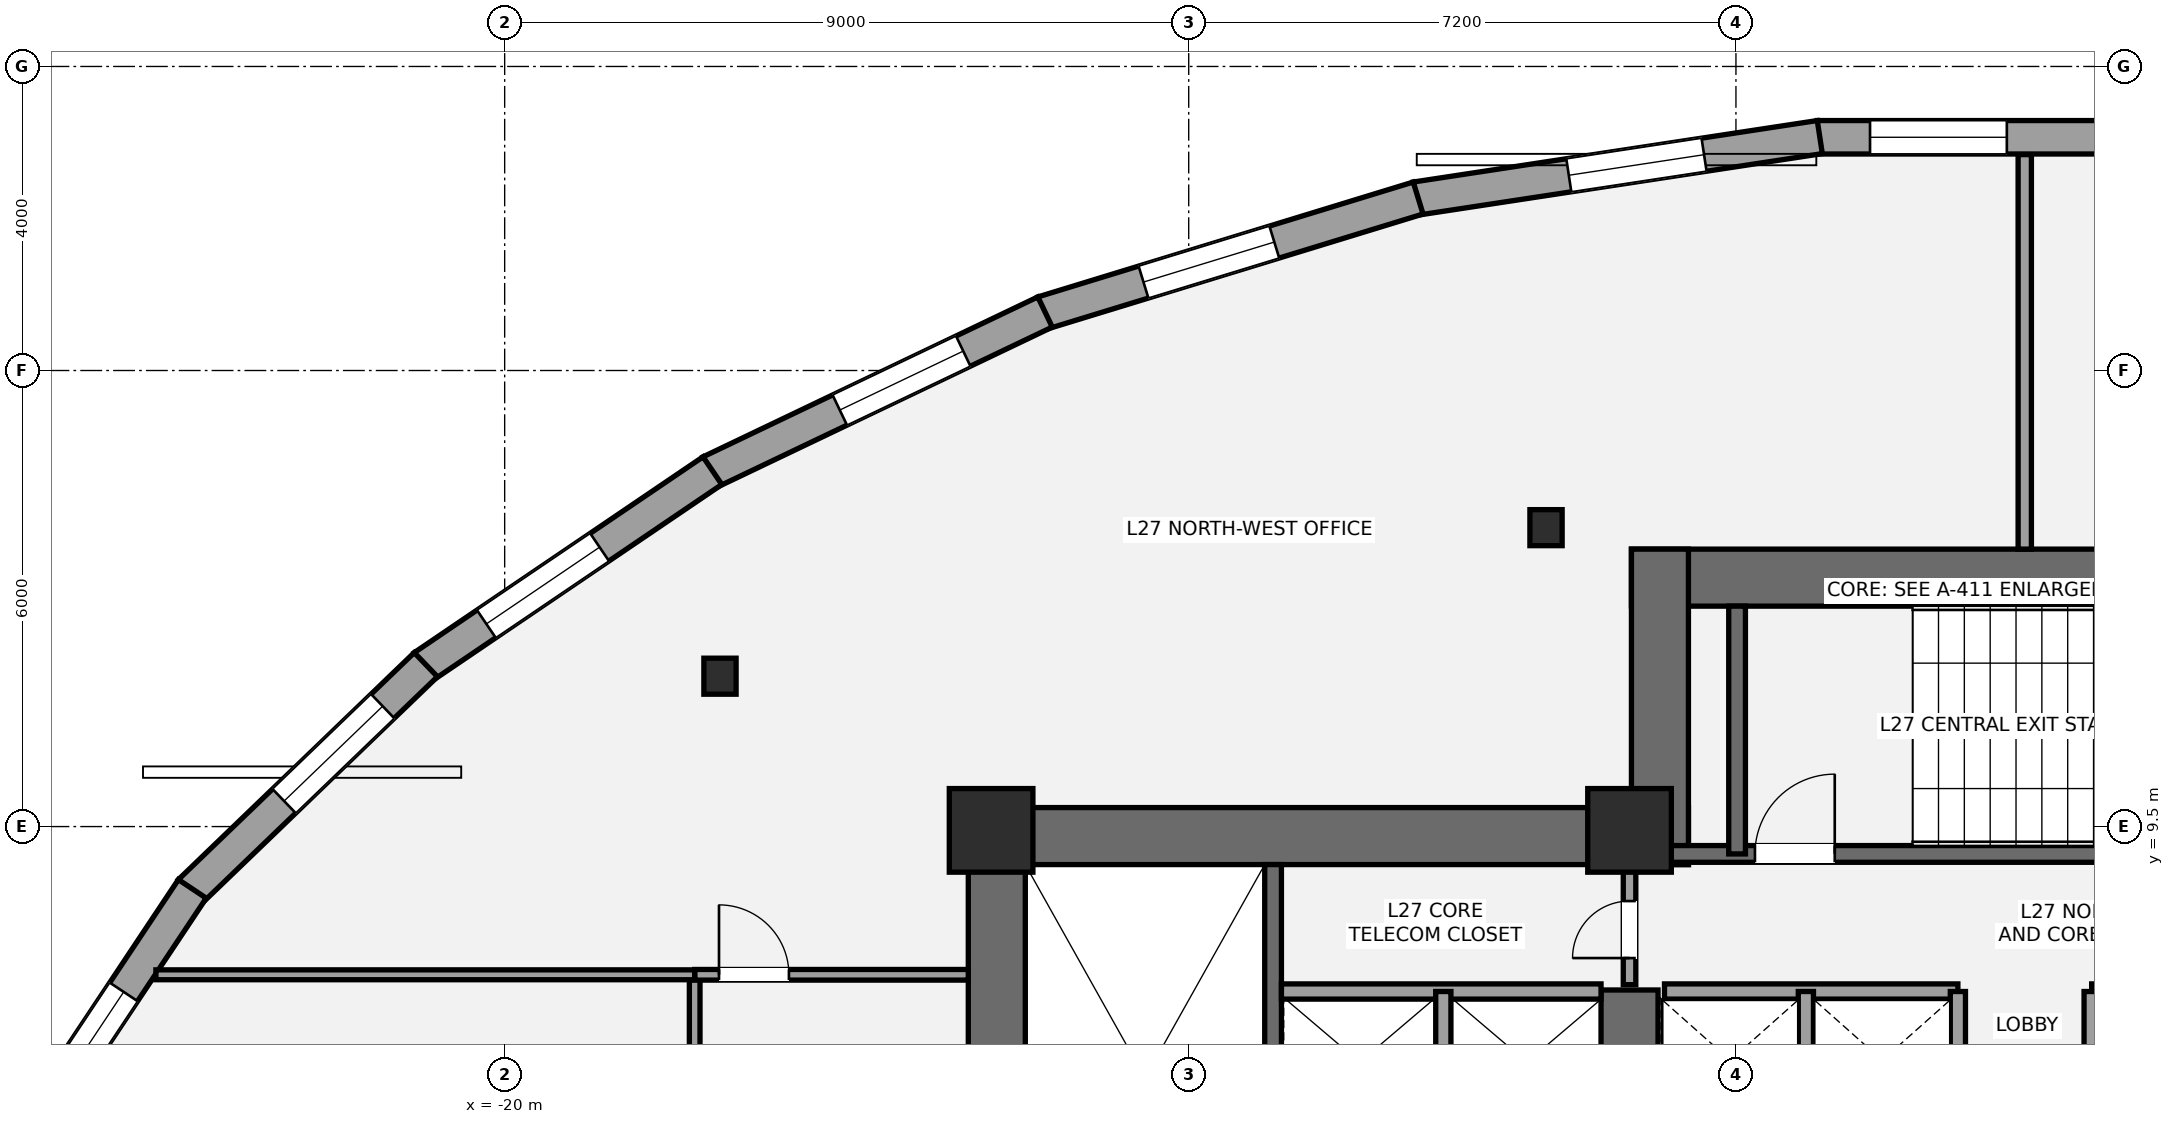
"""IFC4 building model, lengths in metres.
Left out: names, types, materials, properties, quantities, classifications, styles, units other than length and angle.
Written with IfcOpenShell. Run it as: python <this file> out.ifc"""

import sys

from ifc_helpers import new_model, si_unit, direction, frame, frame_2d, origin, origin_2d, place, context, subcontext, project, spatial, rectangle, i_section, extrude, element, fill, save


model = new_model("IFC4")
c1 = context("Model", 3, precision=1e-05, world=origin(), true_north=direction((0.0, 1.0)))
c2 = subcontext(c1, "Body", "Model", "MODEL_VIEW")
j1 = project(units=[si_unit("LENGTHUNIT", "METRE"), si_unit("PLANEANGLEUNIT", "RADIAN")], contexts=[c1])
p1 = place(None, origin())
s1 = spatial("IfcSite", under=j1, at=p1, CompositionType="ELEMENT")
p2 = place(p1, origin())
s2 = spatial("IfcBuilding", under=s1, at=p2, CompositionType="ELEMENT")
p3 = place(p2, frame((0.0, 0.0, 103.6)))
s3 = spatial("IfcBuildingStorey", under=s2, at=p3, CompositionType="ELEMENT", Elevation=103.6)
p4 = place(p3, frame((-13.525, 1.1, 0.0), z_axis=(0.0, 0.0, 1.0), x_axis=(0.0, 1.0, 0.0)))
e1 = element("IfcWall", 1, at=p4, inside=s3, PredefinedType="SHEAR", context=c2, shape_type="SweptSolid", body=[
    extrude(rectangle(XDim=8.65, YDim=0.75, at=frame_2d((4.325, 0.0))), origin(), (0.0, 0.0, 1.0), 3.5),
])
p5 = place(p3, frame((-13.9, 9.375, 0.0), z_axis=(0.0, 0.0, 1.0), x_axis=(1.0, 0.0, 0.0)))
e2 = element("IfcWall", 2, at=p5, inside=s3, PredefinedType="SHEAR", context=c2, shape_type="SweptSolid", body=[
    extrude(rectangle(XDim=9.475, YDim=0.75, at=frame_2d((4.737, 0.0))), origin(), (0.0, 0.0, 1.0), 3.5),
])
p6 = place(p3, frame((-5.2, 5.35, 0.0), z_axis=(0.0, 0.0, 1.0), x_axis=(0.0, 1.0, 0.0)))
e3 = element("IfcWall", 3, at=p6, inside=s3, PredefinedType="SHEAR", context=c2, shape_type="SweptSolid", body=[
    extrude(rectangle(XDim=2.0, YDim=0.75, at=frame_2d((1.0, 0.0))), origin(), (0.0, 0.0, 1.0), 3.5),
])
p7 = place(p3, frame((-9.89, 1.85, 0.0), z_axis=(0.0, 0.0, 1.0), x_axis=(0.0, 1.0, 0.0)))
e4 = element("IfcWall", 4, at=p7, inside=s3, PredefinedType="SHEAR", context=c2, shape_type="SweptSolid", body=[
    extrude(rectangle(XDim=7.15, YDim=0.22, at=frame_2d((3.575, 0.0))), origin(), (0.0, 0.0, 1.0), 3.5),
])
p8 = place(p3, frame((-5.175, 12.775, 0.0), z_axis=(0.0, 0.0, 1.0), x_axis=(1.0, 0.0, 0.0)))
e5 = element("IfcWall", 5, at=p8, inside=s3, PredefinedType="SHEAR", context=c2, shape_type="SweptSolid", body=[
    extrude(rectangle(XDim=10.35, YDim=0.75, at=frame_2d((5.175, 0.0))), origin(), (0.0, 0.0, 1.0), 3.5),
])
p9 = place(p3, frame((-4.8, 9.0, 0.0), z_axis=(0.0, 0.0, 1.0), x_axis=(0.0, 1.0, 0.0)))
e6 = element("IfcWall", 6, at=p9, inside=s3, PredefinedType="SHEAR", context=c2, shape_type="SweptSolid", body=[
    extrude(rectangle(XDim=4.15, YDim=0.75, at=frame_2d((2.075, 0.0))), origin(), (0.0, 0.0, 1.0), 3.5),
])
p10 = place(p3, frame((-4.7, 9.14, 0.0), z_axis=(0.0, 0.0, 1.0), x_axis=(1.0, 0.0, 0.0)))
e7 = element("IfcWall", 7, at=p10, inside=s3, PredefinedType="SHEAR", context=c2, shape_type="SweptSolid", body=[
    extrude(rectangle(XDim=9.3, YDim=0.22, at=frame_2d((4.65, 0.0))), origin(), (0.0, 0.0, 1.0), 3.5),
])
p11 = place(p10, frame((1.15, 0.0, 0.0)))
e8 = element("IfcOpeningElement", 8, at=p11, cuts=e7, PredefinedType="OPENING", context=c2, shape_type="SweptSolid", body=[
    extrude(rectangle(XDim=1.05, YDim=2.15, at=frame_2d((0.525, 1.075))), frame((0.0, 0.12, 0.0), z_axis=(0.0, -1.0, 0.0), x_axis=(1.0, 0.0, 0.0)), (0.0, 0.0, 1.0), 0.24),
])
p12 = place(p3, frame((-3.785, 9.14, 0.0), z_axis=(0.0, 0.0, 1.0), x_axis=(0.0, 1.0, 0.0)))
e9 = element("IfcWall", 9, at=p12, inside=s3, PredefinedType="SHEAR", context=c2, shape_type="SweptSolid", body=[
    extrude(rectangle(XDim=3.26, YDim=0.22, at=frame_2d((1.63, 0.0))), origin(), (0.0, 0.0, 1.0), 3.5),
])
for number, where, z_axis, x_axis in (
    (10, (-13.6, 9.45, 0.0), (0.0, 0.0, 1.0), (1.0, 0.0, 0.0)),
    (11, (-5.2, 9.45, 0.0), (0.0, 0.0, 1.0), (1.0, 0.0, 0.0)),
):
    element("IfcColumn", number, at=place(p3, frame(where, z_axis=z_axis, x_axis=x_axis)), inside=s3, PredefinedType="COLUMN", context=c2, shape_type="SweptSolid", body=[
        extrude(rectangle(XDim=1.1, YDim=1.1, at=origin_2d()), origin(), (0.0, 0.0, 1.0), 3.5),
    ])
for number, where, z_axis, x_axis in (
    (12, (-6.299, 13.433, 0.0), (0.0, 0.0, 1.0), (1.0, 0.0, 0.0)),
    (13, (-17.167, 11.478, 0.0), (0.0, 0.0, 1.0), (1.0, 0.0, 0.0)),
):
    element("IfcColumn", number, at=place(p3, frame(where, z_axis=z_axis, x_axis=x_axis)), inside=s3, PredefinedType="COLUMN", context=c2, shape_type="SweptSolid", body=[
        extrude(i_section(OverallWidth=0.424, OverallDepth=0.474, WebThickness=0.048, FlangeThickness=0.077, at=origin_2d()), origin(), (0.0, 0.0, 1.0), 3.5),
    ])
p13 = place(p3, frame((-2.73, 18.568, 0.0), z_axis=(0.0, 0.0, 1.0), x_axis=(1.0, 0.0, 0.0)))
e14 = element("IfcWall", 14, at=p13, inside=s3, PredefinedType="STANDARD", context=c2, shape_type="SweptSolid", body=[
    extrude(rectangle(XDim=5.459, YDim=0.44, at=frame_2d((2.73, 0.0))), origin(), (0.0, 0.0, 1.0), 2.528),
])
p14 = place(p13, frame((0.694, 0.0, 0.65)))
e15 = element("IfcOpeningElement", 15, at=p14, cuts=e14, PredefinedType="OPENING", context=c2, shape_type="SweptSolid", body=[
    extrude(rectangle(XDim=1.8, YDim=1.7, at=frame_2d((0.9, 0.85))), frame((0.0, 0.23, 0.0), z_axis=(0.0, -1.0, 0.0), x_axis=(1.0, 0.0, 0.0)), (0.0, 0.0, 1.0), 0.46),
])
p15 = place(p3, frame((-8.012, 17.762, 0.0), z_axis=(0.0, 0.0, 1.0), x_axis=(0.988627497469, 0.150385076545, 0.0)))
e16 = element("IfcWall", 16, at=p15, inside=s3, PredefinedType="STANDARD", context=c2, shape_type="SweptSolid", body=[
    extrude(rectangle(XDim=5.377, YDim=0.44, at=frame_2d((2.688, 0.0))), origin(), (0.0, 0.0, 1.0), 2.528),
])
p16 = place(p15, frame((2.037, 0.0, 0.65)))
e17 = element("IfcOpeningElement", 17, at=p16, cuts=e16, PredefinedType="OPENING", context=c2, shape_type="SweptSolid", body=[
    extrude(rectangle(XDim=1.8, YDim=1.7, at=frame_2d((0.9, 0.85))), frame((0.0, 0.23, 0.0), z_axis=(0.0, -1.0, 0.0), x_axis=(1.0, 0.0, 0.0)), (0.0, 0.0, 1.0), 0.46),
])
p17 = place(p3, frame((-12.92, 16.258, 0.0), z_axis=(0.0, 0.0, 1.0), x_axis=(0.956228569431, 0.292620783617, 0.0)))
e18 = element("IfcWall", 18, at=p17, inside=s3, PredefinedType="STANDARD", context=c2, shape_type="SweptSolid", body=[
    extrude(rectangle(XDim=5.165, YDim=0.44, at=frame_2d((2.583, 0.0))), origin(), (0.0, 0.0, 1.0), 2.528),
])
p18 = place(p17, frame((1.386, 0.0, 0.65)))
e19 = element("IfcOpeningElement", 19, at=p18, cuts=e18, PredefinedType="OPENING", context=c2, shape_type="SweptSolid", body=[
    extrude(rectangle(XDim=1.8, YDim=1.7, at=frame_2d((0.9, 0.85))), frame((0.0, 0.23, 0.0), z_axis=(0.0, -1.0, 0.0), x_axis=(1.0, 0.0, 0.0)), (0.0, 0.0, 1.0), 0.46),
])
p19 = place(p3, frame((-17.295, 14.166, 0.0), z_axis=(0.0, 0.0, 1.0), x_axis=(0.902372757907, 0.430956385018, 0.0)))
e20 = element("IfcWall", 20, at=p19, inside=s3, PredefinedType="STANDARD", context=c2, shape_type="SweptSolid", body=[
    extrude(rectangle(XDim=4.882, YDim=0.44, at=frame_2d((2.441, 0.0))), origin(), (0.0, 0.0, 1.0), 2.528),
])
p20 = place(p19, frame((1.888, 0.0, 0.65)))
e21 = element("IfcOpeningElement", 21, at=p20, cuts=e20, PredefinedType="OPENING", context=c2, shape_type="SweptSolid", body=[
    extrude(rectangle(XDim=1.8, YDim=1.7, at=frame_2d((0.9, 0.85))), frame((0.0, 0.23, 0.0), z_axis=(0.0, -1.0, 0.0), x_axis=(1.0, 0.0, 0.0)), (0.0, 0.0, 1.0), 0.46),
])
p21 = place(p3, frame((-21.066, 11.606, 0.0), z_axis=(0.0, 0.0, 1.0), x_axis=(0.827754551165, 0.56109036975, 0.0)))
e22 = element("IfcWall", 22, at=p21, inside=s3, PredefinedType="STANDARD", context=c2, shape_type="SweptSolid", body=[
    extrude(rectangle(XDim=4.591, YDim=0.44, at=frame_2d((2.295, 0.0))), origin(), (0.0, 0.0, 1.0), 2.528),
])
p22 = place(p21, frame((0.997, 0.0, 0.65)))
e23 = element("IfcOpeningElement", 23, at=p22, cuts=e22, PredefinedType="OPENING", context=c2, shape_type="SweptSolid", body=[
    extrude(rectangle(XDim=1.8, YDim=1.7, at=frame_2d((0.9, 0.85))), frame((0.0, 0.23, 0.0), z_axis=(0.0, -1.0, 0.0), x_axis=(1.0, 0.0, 0.0)), (0.0, 0.0, 1.0), 0.46),
])
p23 = place(p3, frame((-24.14, 8.644, 0.0), z_axis=(0.0, 0.0, 1.0), x_axis=(0.720581378362, 0.693370375166, 0.0)))
e24 = element("IfcWall", 24, at=p23, inside=s3, PredefinedType="STANDARD", context=c2, shape_type="SweptSolid", body=[
    extrude(rectangle(XDim=4.307, YDim=0.44, at=frame_2d((2.153, 0.0))), origin(), (0.0, 0.0, 1.0), 2.528),
])
p24 = place(p23, frame((1.719, 0.0, 0.65)))
e25 = element("IfcOpeningElement", 25, at=p24, cuts=e24, PredefinedType="OPENING", context=c2, shape_type="SweptSolid", body=[
    extrude(rectangle(XDim=1.8, YDim=1.7, at=frame_2d((0.9, 0.85))), frame((0.0, 0.23, 0.0), z_axis=(0.0, -1.0, 0.0), x_axis=(1.0, 0.0, 0.0)), (0.0, 0.0, 1.0), 0.46),
])
p25 = place(p3, frame((-26.34, 5.332, 0.0), z_axis=(0.0, 0.0, 1.0), x_axis=(0.554293965046, 0.83232097193, 0.0)))
e26 = element("IfcWall", 26, at=p25, inside=s3, PredefinedType="STANDARD", context=c2, shape_type="SweptSolid", body=[
    extrude(rectangle(XDim=4.023, YDim=0.44, at=frame_2d((2.011, 0.0))), origin(), (0.0, 0.0, 1.0), 2.528),
])
p26 = place(p25, frame((0.594, 0.0, 0.65)))
e27 = element("IfcOpeningElement", 27, at=p26, cuts=e26, PredefinedType="OPENING", context=c2, shape_type="SweptSolid", body=[
    extrude(rectangle(XDim=1.8, YDim=1.7, at=frame_2d((0.9, 0.85))), frame((0.0, 0.23, 0.0), z_axis=(0.0, -1.0, 0.0), x_axis=(1.0, 0.0, 0.0)), (0.0, 0.0, 1.0), 0.46),
])
p27 = place(p3, frame((-9.78, 7.33, 0.0), z_axis=(0.0, 0.0, 1.0), x_axis=(1.0, 0.0, 0.0)))
e28 = element("IfcWall", 28, at=p27, inside=s3, PredefinedType="SOLIDWALL", context=c2, shape_type="SweptSolid", body=[
    extrude(rectangle(XDim=4.205, YDim=0.2, at=frame_2d((2.103, 0.0))), origin(), (0.0, 0.0, 1.0), 3.31),
])
p28 = place(p3, frame((-7.65, 5.47, 0.0), z_axis=(0.0, 0.0, 1.0), x_axis=(0.0, 1.0, 0.0)))
e29 = element("IfcWall", 29, at=p28, inside=s3, PredefinedType="SOLIDWALL", context=c2, shape_type="SweptSolid", body=[
    extrude(rectangle(XDim=1.86, YDim=0.2, at=frame_2d((0.93, 0.0))), origin(), (0.0, 0.0, 1.0), 3.31),
])
for number, where, z_axis, x_axis in (
    (30, (-4.74, 7.33, 0.0), (0.0, 0.0, 1.0), (1.0, 0.0, 0.0)),
    (31, (0.88, 7.33, 0.0), (0.0, 0.0, 1.0), (1.0, 0.0, 0.0)),
):
    element("IfcWall", number, at=place(p3, frame(where, z_axis=z_axis, x_axis=x_axis)), inside=s3, PredefinedType="SOLIDWALL", context=c2, shape_type="SweptSolid", body=[
        extrude(rectangle(XDim=3.86, YDim=0.2, at=frame_2d((1.93, 0.0))), origin(), (0.0, 0.0, 1.0), 3.31),
    ])
for number, where, z_axis, x_axis in (
    (32, (-2.88, 5.52, 0.0), (0.0, 0.0, 1.0), (0.0, 1.0, 0.0)),
    (33, (-0.88, 5.52, 0.0), (0.0, 0.0, 1.0), (0.0, 1.0, 0.0)),
    (34, (0.88, 5.52, 0.0), (0.0, 0.0, 1.0), (0.0, 1.0, 0.0)),
):
    element("IfcWall", number, at=place(p3, frame(where, z_axis=z_axis, x_axis=x_axis)), inside=s3, PredefinedType="SOLIDWALL", context=c2, shape_type="SweptSolid", body=[
        extrude(rectangle(XDim=1.81, YDim=0.2, at=frame_2d((0.905, 0.0))), origin(), (0.0, 0.0, 1.0), 3.31),
    ])
p29 = place(p3, frame((-5.2, 7.42, 0.0), z_axis=(0.0, 0.0, 1.0), x_axis=(0.0, 1.0, 0.0)))
e35 = element("IfcWall", 35, at=p29, inside=s3, PredefinedType="PARTITIONING", context=c2, shape_type="SweptSolid", body=[
    extrude(rectangle(XDim=1.58, YDim=0.165, at=frame_2d((0.79, 0.0))), origin(), (0.0, 0.0, 1.0), 3.31),
])
p30 = place(p29, frame((0.35, 0.0, 0.0)))
e36 = element("IfcOpeningElement", 36, at=p30, cuts=e35, PredefinedType="OPENING", context=c2, shape_type="SweptSolid", body=[
    extrude(rectangle(XDim=0.75, YDim=2.1, at=frame_2d((0.375, 1.05))), frame((0.0, 0.093, 0.0), z_axis=(0.0, -1.0, 0.0), x_axis=(1.0, 0.0, 0.0)), (0.0, 0.0, 1.0), 0.185),
])
p31 = place(p3, frame((-17.5, -13.748, 0.0), z_axis=(0.0, 0.0, 1.0), x_axis=(0.0, 1.0, 0.0)))
e37 = element("IfcWall", 37, at=p31, inside=s3, PredefinedType="PARTITIONING", context=c2, shape_type="SweptSolid", body=[
    extrude(rectangle(XDim=21.298, YDim=0.14, at=frame_2d((10.649, 0.0))), origin(), (0.0, 0.0, 1.0), 2.688),
])
p32 = place(p31, frame((10.499, 0.0, 0.0)))
e38 = element("IfcOpeningElement", 38, at=p32, cuts=e37, PredefinedType="OPENING", context=c2, shape_type="SweptSolid", body=[
    extrude(rectangle(XDim=0.9, YDim=2.1, at=frame_2d((0.45, 1.05))), frame((0.0, 0.08, 0.0), z_axis=(0.0, -1.0, 0.0), x_axis=(1.0, 0.0, 0.0)), (0.0, 0.0, 1.0), 0.16),
])
p33 = place(p31, frame((17.974, 0.0, 0.0)))
e39 = element("IfcOpeningElement", 39, at=p33, cuts=e37, PredefinedType="OPENING", context=c2, shape_type="SweptSolid", body=[
    extrude(rectangle(XDim=0.9, YDim=2.1, at=frame_2d((0.45, 1.05))), frame((0.0, 0.08, 0.0), z_axis=(0.0, -1.0, 0.0), x_axis=(1.0, 0.0, 0.0)), (0.0, 0.0, 1.0), 0.16),
])
p34 = place(p3, frame((-17.5, 7.55, 0.0), z_axis=(0.0, 0.0, 1.0), x_axis=(1.0, 0.0, 0.0)))
e40 = element("IfcWall", 40, at=p34, inside=s3, PredefinedType="PARTITIONING", context=c2, shape_type="SweptSolid", body=[
    extrude(rectangle(XDim=3.6, YDim=0.14, at=frame_2d((1.8, 0.0))), origin(), (0.0, 0.0, 1.0), 3.31),
])
p35 = place(p34, frame((0.32, 0.0, 0.0)))
e41 = element("IfcOpeningElement", 41, at=p35, cuts=e40, PredefinedType="OPENING", context=c2, shape_type="SweptSolid", body=[
    extrude(rectangle(XDim=0.92, YDim=2.15, at=frame_2d((0.46, 1.075))), frame((0.0, 0.08, 0.0), z_axis=(0.0, -1.0, 0.0), x_axis=(1.0, 0.0, 0.0)), (0.0, 0.0, 1.0), 0.16),
])
p36 = place(p3, frame((0.0, 13.15, 0.0), z_axis=(0.0, 0.0, 1.0), x_axis=(0.0, 1.0, 0.0)))
e42 = element("IfcWall", 42, at=p36, inside=s3, PredefinedType="PARTITIONING", context=c2, shape_type="SweptSolid", body=[
    extrude(rectangle(XDim=5.19, YDim=0.175, at=frame_2d((2.595, 0.0))), origin(), (0.0, 0.0, 1.0), 3.31),
])
p37 = place(p3, frame((-24.589, 7.55, 0.0), z_axis=(0.0, 0.0, 1.0), x_axis=(1.0, 0.0, 0.0)))
e43 = element("IfcWall", 43, at=p37, inside=s3, PredefinedType="PARTITIONING", context=c2, shape_type="SweptSolid", body=[
    extrude(rectangle(XDim=7.089, YDim=0.13, at=frame_2d((3.544, 0.0))), origin(), (0.0, 0.0, 1.0), 2.763),
])
p38 = place(p14, origin())
e44 = element("IfcWindow", 44, at=p38, inside=s3, PartitioningType="SINGLE_PANEL", PredefinedType="WINDOW", context=c2, shape_type="SweptSolid", body=[
    extrude(rectangle(XDim=1.8, YDim=1.7, at=frame_2d((0.9, 0.85))), frame((0.0, -0.01, 0.0), z_axis=(0.0, -1.0, 0.0), x_axis=(1.0, 0.0, 0.0)), (0.0, 0.0, 1.0), 0.06),
])
fill(e15, e44)
p39 = place(p16, origin())
e45 = element("IfcWindow", 45, at=p39, inside=s3, PartitioningType="SINGLE_PANEL", PredefinedType="WINDOW", context=c2, shape_type="SweptSolid", body=[
    extrude(rectangle(XDim=1.8, YDim=1.7, at=frame_2d((0.9, 0.85))), frame((0.0, -0.01, 0.0), z_axis=(0.0, -1.0, 0.0), x_axis=(1.0, 0.0, 0.0)), (0.0, 0.0, 1.0), 0.06),
])
fill(e17, e45)
p40 = place(p18, origin())
e46 = element("IfcWindow", 46, at=p40, inside=s3, PartitioningType="SINGLE_PANEL", PredefinedType="WINDOW", context=c2, shape_type="SweptSolid", body=[
    extrude(rectangle(XDim=1.8, YDim=1.7, at=frame_2d((0.9, 0.85))), frame((0.0, -0.01, 0.0), z_axis=(0.0, -1.0, 0.0), x_axis=(1.0, 0.0, 0.0)), (0.0, 0.0, 1.0), 0.06),
])
fill(e19, e46)
p41 = place(p20, origin())
e47 = element("IfcWindow", 47, at=p41, inside=s3, PartitioningType="SINGLE_PANEL", PredefinedType="WINDOW", context=c2, shape_type="SweptSolid", body=[
    extrude(rectangle(XDim=1.8, YDim=1.7, at=frame_2d((0.9, 0.85))), frame((0.0, -0.01, 0.0), z_axis=(0.0, -1.0, 0.0), x_axis=(1.0, 0.0, 0.0)), (0.0, 0.0, 1.0), 0.06),
])
fill(e21, e47)
p42 = place(p22, origin())
e48 = element("IfcWindow", 48, at=p42, inside=s3, PartitioningType="SINGLE_PANEL", PredefinedType="WINDOW", context=c2, shape_type="SweptSolid", body=[
    extrude(rectangle(XDim=1.8, YDim=1.7, at=frame_2d((0.9, 0.85))), frame((0.0, -0.01, 0.0), z_axis=(0.0, -1.0, 0.0), x_axis=(1.0, 0.0, 0.0)), (0.0, 0.0, 1.0), 0.06),
])
fill(e23, e48)
p43 = place(p24, origin())
e49 = element("IfcWindow", 49, at=p43, inside=s3, PartitioningType="SINGLE_PANEL", PredefinedType="WINDOW", context=c2, shape_type="SweptSolid", body=[
    extrude(rectangle(XDim=1.8, YDim=1.7, at=frame_2d((0.9, 0.85))), frame((0.0, -0.01, 0.0), z_axis=(0.0, -1.0, 0.0), x_axis=(1.0, 0.0, 0.0)), (0.0, 0.0, 1.0), 0.06),
])
fill(e25, e49)
p44 = place(p26, origin())
e50 = element("IfcWindow", 50, at=p44, inside=s3, PartitioningType="SINGLE_PANEL", PredefinedType="WINDOW", context=c2, shape_type="SweptSolid", body=[
    extrude(rectangle(XDim=1.8, YDim=1.7, at=frame_2d((0.9, 0.85))), frame((0.0, -0.01, 0.0), z_axis=(0.0, -1.0, 0.0), x_axis=(1.0, 0.0, 0.0)), (0.0, 0.0, 1.0), 0.06),
])
fill(e27, e50)
p45 = place(p11, origin())
e51 = element("IfcDoor", 51, at=p45, inside=s3, OperationType="SINGLE_SWING_RIGHT", PredefinedType="DOOR", context=c2, shape_type="SweptSolid", body=[
    extrude(rectangle(XDim=1.05, YDim=2.15, at=frame_2d((0.525, 1.075))), frame((0.0, 0.025, 0.0), z_axis=(0.0, -1.0, 0.0), x_axis=(1.0, 0.0, 0.0)), (0.0, 0.0, 1.0), 0.05),
])
fill(e8, e51)
p46 = place(p30, origin())
e52 = element("IfcDoor", 52, at=p46, inside=s3, OperationType="SINGLE_SWING_LEFT", PredefinedType="DOOR", context=c2, shape_type="SweptSolid", body=[
    extrude(rectangle(XDim=0.75, YDim=2.1, at=frame_2d((0.375, 1.05))), frame((0.0, 0.025, 0.0), z_axis=(0.0, -1.0, 0.0), x_axis=(1.0, 0.0, 0.0)), (0.0, 0.0, 1.0), 0.05),
])
fill(e36, e52)
p47 = place(p35, origin())
e53 = element("IfcDoor", 53, at=p47, inside=s3, OperationType="SINGLE_SWING_LEFT", PredefinedType="DOOR", context=c2, shape_type="SweptSolid", body=[
    extrude(rectangle(XDim=0.92, YDim=2.15, at=frame_2d((0.46, 1.075))), frame((0.0, 0.025, 0.0), z_axis=(0.0, -1.0, 0.0), x_axis=(1.0, 0.0, 0.0)), (0.0, 0.0, 1.0), 0.05),
])
fill(e41, e53)
save(model, sys.argv[1])
